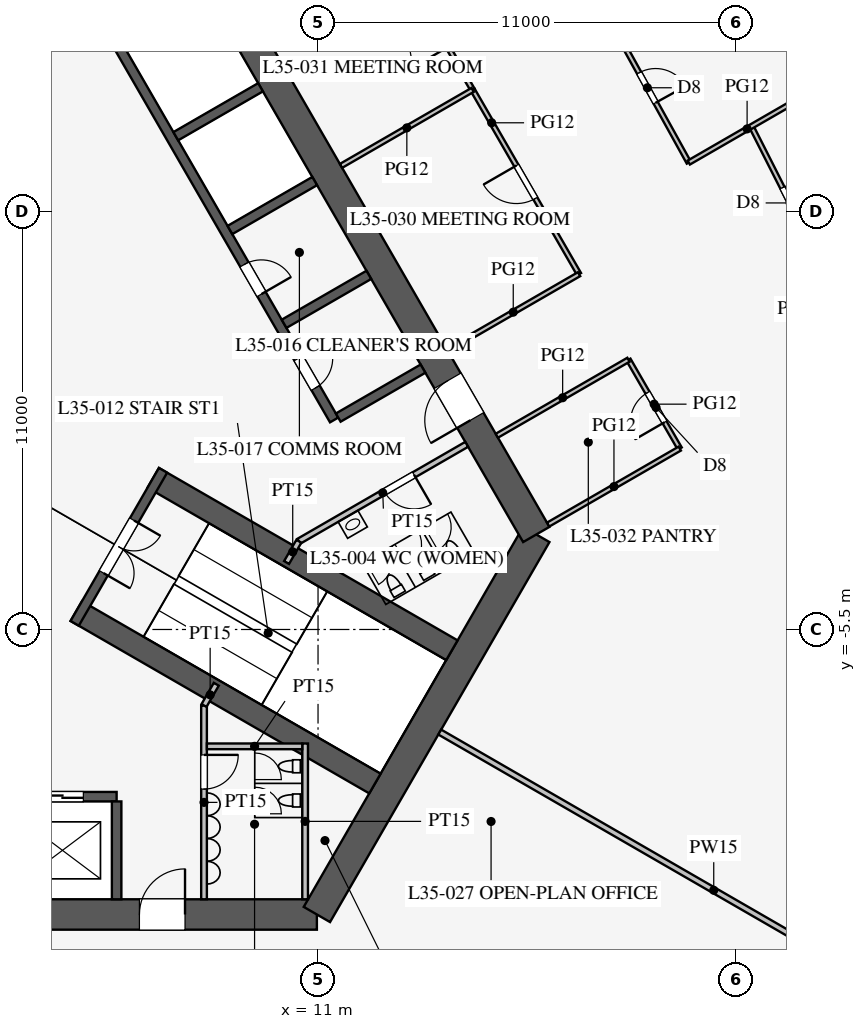
"""IFC4 building model, lengths in metres.
Left out: names, types, materials, properties, quantities, classifications, styles, units other than length and angle.
Written with IfcOpenShell. Run it as: python <this file> out.ifc"""

import sys

from ifc_helpers import new_model, si_unit, direction, frame, frame_2d, origin, place, context, subcontext, project, spatial, rectangle, extrude, element, fill, save


model = new_model("IFC4")
c1 = context("Model", 3, precision=1e-05, world=origin(), true_north=direction((0.0, 1.0)))
c2 = subcontext(c1, "Body", "Model", "MODEL_VIEW")
j1 = project(units=[si_unit("LENGTHUNIT", "METRE"), si_unit("PLANEANGLEUNIT", "RADIAN")], contexts=[c1])
p1 = place(None, origin())
s1 = spatial("IfcSite", under=j1, at=p1, CompositionType="ELEMENT")
p2 = place(p1, origin())
s2 = spatial("IfcBuilding", under=s1, at=p2, CompositionType="ELEMENT")
p3 = place(p2, frame((0.0, 0.0, 153.5)))
s3 = spatial("IfcBuildingStorey", under=s2, at=p3, CompositionType="ELEMENT", Elevation=153.5)
p4 = place(p3, frame((-10.97, -13.0, 0.0), z_axis=(0.0, 0.0, 1.0), x_axis=(1.0, 0.0, 0.0)))
e1 = element("IfcWall", 1, at=p4, inside=s3, PredefinedType="SHEAR", context=c2, shape_type="SweptSolid", body=[
    extrude(rectangle(XDim=21.939, YDim=0.8, at=frame_2d((10.97, 0.0))), origin(), (0.0, 0.0, 1.0), 4.2),
])
p5 = place(p4, frame((17.27, 0.0, 0.0)))
e2 = element("IfcOpeningElement", 2, at=p5, cuts=e1, PredefinedType="OPENING", context=c2, shape_type="SweptSolid", body=[
    extrude(rectangle(XDim=1.2, YDim=2.1, at=frame_2d((0.6, 1.05))), frame((0.0, 0.41, 0.0), z_axis=(0.0, -1.0, 0.0), x_axis=(1.0, 0.0, 0.0)), (0.0, 0.0, 1.0), 0.82),
])
p6 = place(p4, frame((3.47, 0.0, 0.0)))
e3 = element("IfcOpeningElement", 3, at=p6, cuts=e1, PredefinedType="OPENING", context=c2, shape_type="SweptSolid", body=[
    extrude(rectangle(XDim=1.2, YDim=2.1, at=frame_2d((0.6, 1.05))), frame((0.0, 0.41, 0.0), z_axis=(0.0, -1.0, 0.0), x_axis=(1.0, 0.0, 0.0)), (0.0, 0.0, 1.0), 0.82),
])
p7 = place(p3, frame((10.97, -13.0, 0.0), z_axis=(0.0, 0.0, 1.0), x_axis=(0.499995765644, 0.866027848477, 0.0)))
e4 = element("IfcWall", 4, at=p7, inside=s3, PredefinedType="SHEAR", context=c2, shape_type="SweptSolid", body=[
    extrude(rectangle(XDim=11.547, YDim=0.8, at=frame_2d((5.773, 0.0))), origin(), (0.0, 0.0, 1.0), 4.2),
])
p8 = place(p3, frame((16.743, -3.0, 0.0), z_axis=(0.0, 0.0, 1.0), x_axis=(-0.500002442456, 0.866023993627, 0.0)))
e5 = element("IfcWall", 5, at=p8, inside=s3, PredefinedType="SHEAR", context=c2, shape_type="SweptSolid", body=[
    extrude(rectangle(XDim=21.939, YDim=0.8, at=frame_2d((10.97, 0.0))), origin(), (0.0, 0.0, 1.0), 4.2),
])
p9 = place(p8, frame((17.27, 0.0, 0.0)))
e6 = element("IfcOpeningElement", 6, at=p9, cuts=e5, PredefinedType="OPENING", context=c2, shape_type="SweptSolid", body=[
    extrude(rectangle(XDim=1.2, YDim=2.1, at=frame_2d((0.6, 1.05))), frame((0.0, 0.41, 0.0), z_axis=(0.0, -1.0, 0.0), x_axis=(1.0, 0.0, 0.0)), (0.0, 0.0, 1.0), 0.82),
])
p10 = place(p8, frame((3.47, 0.0, 0.0)))
e7 = element("IfcOpeningElement", 7, at=p10, cuts=e5, PredefinedType="OPENING", context=c2, shape_type="SweptSolid", body=[
    extrude(rectangle(XDim=1.2, YDim=2.1, at=frame_2d((0.6, 1.05))), frame((0.0, 0.41, 0.0), z_axis=(0.0, -1.0, 0.0), x_axis=(1.0, 0.0, 0.0)), (0.0, 0.0, 1.0), 0.82),
])
p11 = place(p3, frame((-5.7, -9.9, 0.0), z_axis=(0.0, 0.0, 1.0), x_axis=(1.0, 0.0, 0.0)))
e8 = element("IfcWall", 8, at=p11, inside=s3, PredefinedType="SHEAR", context=c2, shape_type="SweptSolid", body=[
    extrude(rectangle(XDim=11.4, YDim=0.25, at=frame_2d((5.7, 0.0))), origin(), (0.0, 0.0, 1.0), 4.2),
])
p12 = place(p11, frame((0.875, 0.0, 0.0)))
e9 = element("IfcOpeningElement", 9, at=p12, cuts=e8, PredefinedType="OPENING", context=c2, shape_type="SweptSolid", body=[
    extrude(rectangle(XDim=1.1, YDim=2.2, at=frame_2d((0.55, 1.1))), frame((0.0, 0.135, 0.0), z_axis=(0.0, -1.0, 0.0), x_axis=(1.0, 0.0, 0.0)), (0.0, 0.0, 1.0), 0.27),
])
p13 = place(p11, frame((3.725, 0.0, 0.0)))
e10 = element("IfcOpeningElement", 10, at=p13, cuts=e8, PredefinedType="OPENING", context=c2, shape_type="SweptSolid", body=[
    extrude(rectangle(XDim=1.1, YDim=2.2, at=frame_2d((0.55, 1.1))), frame((0.0, 0.135, 0.0), z_axis=(0.0, -1.0, 0.0), x_axis=(1.0, 0.0, 0.0)), (0.0, 0.0, 1.0), 0.27),
])
p14 = place(p11, frame((6.575, 0.0, 0.0)))
e11 = element("IfcOpeningElement", 11, at=p14, cuts=e8, PredefinedType="OPENING", context=c2, shape_type="SweptSolid", body=[
    extrude(rectangle(XDim=1.1, YDim=2.2, at=frame_2d((0.55, 1.1))), frame((0.0, 0.135, 0.0), z_axis=(0.0, -1.0, 0.0), x_axis=(1.0, 0.0, 0.0)), (0.0, 0.0, 1.0), 0.27),
])
p15 = place(p11, frame((9.425, 0.0, 0.0)))
e12 = element("IfcOpeningElement", 12, at=p15, cuts=e8, PredefinedType="OPENING", context=c2, shape_type="SweptSolid", body=[
    extrude(rectangle(XDim=1.1, YDim=2.2, at=frame_2d((0.55, 1.1))), frame((0.0, 0.135, 0.0), z_axis=(0.0, -1.0, 0.0), x_axis=(1.0, 0.0, 0.0)), (0.0, 0.0, 1.0), 0.27),
])
p16 = place(p3, frame((5.7, -10.025, 0.0), z_axis=(0.0, 0.0, 1.0), x_axis=(0.0, -1.0, 0.0)))
e13 = element("IfcWall", 13, at=p16, inside=s3, PredefinedType="SHEAR", context=c2, shape_type="SweptSolid", body=[
    extrude(rectangle(XDim=2.575, YDim=0.25, at=frame_2d((1.288, 0.0))), origin(), (0.0, 0.0, 1.0), 4.2),
])
p17 = place(p3, frame((11.424, 0.014, 0.0), z_axis=(0.0, 0.0, 1.0), x_axis=(-0.500001763848, 0.866024385424, 0.0)))
e14 = element("IfcWall", 14, at=p17, inside=s3, PredefinedType="SHEAR", context=c2, shape_type="SweptSolid", body=[
    extrude(rectangle(XDim=11.4, YDim=0.25, at=frame_2d((5.7, 0.0))), origin(), (0.0, 0.0, 1.0), 4.2),
])
p18 = place(p17, frame((0.975, 0.0, 0.0)))
e15 = element("IfcOpeningElement", 15, at=p18, cuts=e14, PredefinedType="OPENING", context=c2, shape_type="SweptSolid", body=[
    extrude(rectangle(XDim=0.9, YDim=2.1, at=frame_2d((0.45, 1.05))), frame((0.0, 0.135, 0.0), z_axis=(0.0, -1.0, 0.0), x_axis=(1.0, 0.0, 0.0)), (0.0, 0.0, 1.0), 0.27),
])
p19 = place(p17, frame((3.825, 0.0, 0.0)))
e16 = element("IfcOpeningElement", 16, at=p19, cuts=e14, PredefinedType="OPENING", context=c2, shape_type="SweptSolid", body=[
    extrude(rectangle(XDim=0.9, YDim=2.1, at=frame_2d((0.45, 1.05))), frame((0.0, 0.135, 0.0), z_axis=(0.0, -1.0, 0.0), x_axis=(1.0, 0.0, 0.0)), (0.0, 0.0, 1.0), 0.27),
])
for number, where, z_axis, x_axis in (
    (17, (11.532, 0.076, 0.0), (0.0, 0.0, 1.0), (0.866, 0.5, 0.0)),
    (18, (10.107, 2.544, 0.0), (0.0, 0.0, 1.0), (0.866, 0.5, 0.0)),
    (19, (8.682, 5.012, 0.0), (0.0, 0.0, 1.0), (0.866, 0.5, 0.0)),
    (20, (7.257, 7.481, 0.0), (0.0, 0.0, 1.0), (0.866, 0.5, 0.0)),
):
    element("IfcWall", number, at=place(p3, frame(where, z_axis=z_axis, x_axis=x_axis)), inside=s3, PredefinedType="SHEAR", context=c2, shape_type="SweptSolid", body=[
        extrude(rectangle(XDim=2.575, YDim=0.25, at=frame_2d((1.288, 0.0))), origin(), (0.0, 0.0, 1.0), 4.2),
    ])
for number, where, z_axis, x_axis in (
    (21, (4.638, -5.016, 0.0), (0.0, 0.0, 1.0), (0.866, -0.5, 0.0)),
    (22, (6.663, -1.509, 0.0), (0.0, 0.0, 1.0), (0.866, -0.5, 0.0)),
):
    element("IfcWall", number, at=place(p3, frame(where, z_axis=z_axis, x_axis=x_axis)), inside=s3, PredefinedType="SHEAR", context=c2, shape_type="SweptSolid", body=[
        extrude(rectangle(XDim=9.075, YDim=0.6, at=frame_2d((4.538, 0.0))), origin(), (0.0, 0.0, 1.0), 4.2),
    ])
p20 = place(p3, frame((4.597, -5.339, 0.0), z_axis=(0.0, 0.0, 1.0), x_axis=(0.499984536904, 0.866034331223, 0.0)))
e23 = element("IfcWall", 23, at=p20, inside=s3, PredefinedType="SHEAR", context=c2, shape_type="SweptSolid", body=[
    extrude(rectangle(XDim=4.65, YDim=0.25, at=frame_2d((2.325, 0.0))), origin(), (0.0, 0.0, 1.0), 4.2),
])
p21 = place(p20, frame((1.525, 0.0, 0.0)))
e24 = element("IfcOpeningElement", 24, at=p21, cuts=e23, PredefinedType="OPENING", context=c2, shape_type="SweptSolid", body=[
    extrude(rectangle(XDim=1.6, YDim=2.1, at=frame_2d((0.8, 1.05))), frame((0.0, 0.135, 0.0), z_axis=(0.0, -1.0, 0.0), x_axis=(1.0, 0.0, 0.0)), (0.0, 0.0, 1.0), 0.27),
])
p22 = place(p3, frame((8.0, -7.5, 0.0), z_axis=(0.0, 0.0, 1.0), x_axis=(0.0, -1.0, 0.0)))
e25 = element("IfcWall", 25, at=p22, inside=s3, PredefinedType="PARTITIONING", context=c2, shape_type="SweptSolid", body=[
    extrude(rectangle(XDim=5.1, YDim=0.15, at=frame_2d((2.55, 0.0))), origin(), (0.0, 0.0, 1.0), 4.0),
])
p23 = place(p22, frame((1.3, 0.0, 0.0)))
e26 = element("IfcOpeningElement", 26, at=p23, cuts=e25, PredefinedType="OPENING", context=c2, shape_type="SweptSolid", body=[
    extrude(rectangle(XDim=0.9, YDim=2.1, at=frame_2d((0.45, 1.05))), frame((0.0, 0.085, 0.0), z_axis=(0.0, -1.0, 0.0), x_axis=(1.0, 0.0, 0.0)), (0.0, 0.0, 1.0), 0.17),
])
p24 = place(p3, frame((10.495, -3.178, 0.0), z_axis=(0.0, 0.0, 1.0), x_axis=(0.86602216432, 0.500005610874, 0.0)))
e27 = element("IfcWall", 27, at=p24, inside=s3, PredefinedType="PARTITIONING", context=c2, shape_type="SweptSolid", body=[
    extrude(rectangle(XDim=5.1, YDim=0.15, at=frame_2d((2.55, 0.0))), origin(), (0.0, 0.0, 1.0), 4.0),
])
p25 = place(p24, frame((2.6, 0.0, 0.0)))
e28 = element("IfcOpeningElement", 28, at=p25, cuts=e27, PredefinedType="OPENING", context=c2, shape_type="SweptSolid", body=[
    extrude(rectangle(XDim=0.9, YDim=2.1, at=frame_2d((0.45, 1.05))), frame((0.0, 0.085, 0.0), z_axis=(0.0, -1.0, 0.0), x_axis=(1.0, 0.0, 0.0)), (0.0, 0.0, 1.0), 0.17),
])
for number, where, z_axis, x_axis in (
    (29, (8.0, -7.5, 0.0), (0.0, 0.0, 1.0), (0.5, 0.866, 0.0)),
    (30, (10.495, -3.178, 0.0), (0.0, 0.0, 1.0), (-0.5, -0.866, 0.0)),
):
    element("IfcWall", number, at=place(p3, frame(where, z_axis=z_axis, x_axis=x_axis)), inside=s3, PredefinedType="PARTITIONING", context=c2, shape_type="SweptSolid", body=[
        extrude(rectangle(XDim=0.645, YDim=0.15, at=frame_2d((0.323, 0.0))), origin(), (0.0, 0.0, 1.0), 4.0),
    ])
p26 = place(p3, frame((10.66, -8.5, 0.0), z_axis=(0.0, 0.0, 1.0), x_axis=(0.0, -1.0, 0.0)))
e31 = element("IfcWall", 31, at=p26, inside=s3, PredefinedType="PARTITIONING", context=c2, shape_type="SweptSolid", body=[
    extrude(rectangle(XDim=4.1, YDim=0.15, at=frame_2d((2.05, 0.0))), origin(), (0.0, 0.0, 1.0), 4.0),
])
p27 = place(p3, frame((8.075, -8.575, 0.0), z_axis=(0.0, 0.0, 1.0), x_axis=(1.0, 0.0, 0.0)))
e32 = element("IfcWall", 32, at=p27, inside=s3, PredefinedType="PARTITIONING", context=c2, shape_type="SweptSolid", body=[
    extrude(rectangle(XDim=2.51, YDim=0.15, at=frame_2d((1.255, 0.0))), origin(), (0.0, 0.0, 1.0), 4.0),
])
p28 = place(p3, frame((14.203, -8.2, 0.0), z_axis=(0.0, 0.0, 1.0), x_axis=(0.866024668836, -0.500001272966, 0.0)))
e33 = element("IfcWall", 33, at=p28, inside=s3, PredefinedType="PARTITIONING", context=c2, shape_type="SweptSolid", body=[
    extrude(rectangle(XDim=16.65, YDim=0.15, at=frame_2d((8.325, 0.0))), origin(), (0.0, 0.0, 1.0), 2.3),
])
p29 = place(p3, frame((15.069, 8.7, 0.0), z_axis=(0.0, 0.0, 1.0), x_axis=(-0.500012057535, 0.866018442252, 0.0)))
e34 = element("IfcWall", 34, at=p29, inside=s3, PredefinedType="PARTITIONING", context=c2, shape_type="SweptSolid", body=[
    extrude(rectangle(XDim=3.6, YDim=0.12, at=frame_2d((1.8, 0.0))), origin(), (0.0, 0.0, 1.0), 2.9),
])
p30 = place(p29, frame((1.3, 0.0, 0.15)))
e35 = element("IfcOpeningElement", 35, at=p30, cuts=e34, PredefinedType="OPENING", context=c2, shape_type="SweptSolid", body=[
    extrude(rectangle(XDim=1.0, YDim=2.1, at=frame_2d((0.5, 1.05))), frame((0.0, 0.07, 0.0), z_axis=(0.0, -1.0, 0.0), x_axis=(1.0, 0.0, 0.0)), (0.0, 0.0, 1.0), 0.14),
])
p31 = place(p3, frame((20.519, -0.74, 0.0), z_axis=(0.0, 0.0, 1.0), x_axis=(-0.4999416173, 0.866059108428, 0.0)))
e36 = element("IfcWall", 36, at=p31, inside=s3, PredefinedType="PARTITIONING", context=c2, shape_type="SweptSolid", body=[
    extrude(rectangle(XDim=2.7, YDim=0.12, at=frame_2d((1.35, 0.0))), origin(), (0.0, 0.0, 1.0), 2.9),
])
p32 = place(p31, frame((0.8, 0.0, 0.15)))
e37 = element("IfcOpeningElement", 37, at=p32, cuts=e36, PredefinedType="OPENING", context=c2, shape_type="SweptSolid", body=[
    extrude(rectangle(XDim=0.9, YDim=2.1, at=frame_2d((0.45, 1.05))), frame((0.0, 0.07, 0.0), z_axis=(0.0, -1.0, 0.0), x_axis=(1.0, 0.0, 0.0)), (0.0, 0.0, 1.0), 0.14),
])
p33 = place(p3, frame((17.869, 3.85, 0.0), z_axis=(0.0, 0.0, 1.0), x_axis=(-0.500016814911, 0.866015695474, 0.0)))
e38 = element("IfcWall", 38, at=p33, inside=s3, PredefinedType="PARTITIONING", context=c2, shape_type="SweptSolid", body=[
    extrude(rectangle(XDim=5.6, YDim=0.12, at=frame_2d((2.8, 0.0))), origin(), (0.0, 0.0, 1.0), 2.9),
])
p34 = place(p33, frame((2.3, 0.0, 0.15)))
e39 = element("IfcOpeningElement", 39, at=p34, cuts=e38, PredefinedType="OPENING", context=c2, shape_type="SweptSolid", body=[
    extrude(rectangle(XDim=1.0, YDim=2.1, at=frame_2d((0.5, 1.05))), frame((0.0, 0.07, 0.0), z_axis=(0.0, -1.0, 0.0), x_axis=(1.0, 0.0, 0.0)), (0.0, 0.0, 1.0), 0.14),
])
p35 = place(p3, frame((11.605, 6.7, 0.0), z_axis=(0.0, 0.0, 1.0), x_axis=(0.866026010844, 0.49999894854, 0.0)))
e40 = element("IfcWall", 40, at=p35, inside=s3, PredefinedType="PARTITIONING", context=c2, shape_type="SweptSolid", body=[
    extrude(rectangle(XDim=4.0, YDim=0.12, at=frame_2d((2.0, 0.0))), origin(), (0.0, 0.0, 1.0), 2.8),
])
for number, where, z_axis, x_axis in (
    (41, (17.055, -2.74, 0.0), (0.0, 0.0, 1.0), (0.866, 0.5, 0.0)),
    (42, (14.405, 1.85, 0.0), (0.0, 0.0, 1.0), (0.866, 0.5, 0.0)),
    (43, (15.705, -0.401, 0.0), (0.0, 0.0, 1.0), (0.866, 0.5, 0.0)),
):
    element("IfcWall", number, at=place(p3, frame(where, z_axis=z_axis, x_axis=x_axis)), inside=s3, PredefinedType="PARTITIONING", context=c2, shape_type="SweptSolid", body=[
        extrude(rectangle(XDim=4.0, YDim=0.12, at=frame_2d((2.0, 0.0))), origin(), (0.0, 0.0, 1.0), 2.9),
    ])
p36 = place(p3, frame((20.756, 6.787, 0.0), z_axis=(0.0, 0.0, 1.0), x_axis=(-0.484292898211, 0.874905931368, 0.0)))
e44 = element("IfcWall", 44, at=p36, inside=s3, PredefinedType="PARTITIONING", context=c2, shape_type="SweptSolid", body=[
    extrude(rectangle(XDim=4.501, YDim=0.12, at=frame_2d((2.25, 0.0))), origin(), (0.0, 0.0, 1.0), 2.9),
])
p37 = place(p36, frame((1.8, 0.0, 0.15)))
e45 = element("IfcOpeningElement", 45, at=p37, cuts=e44, PredefinedType="OPENING", context=c2, shape_type="SweptSolid", body=[
    extrude(rectangle(XDim=0.9, YDim=2.1, at=frame_2d((0.45, 1.05))), frame((0.0, 0.07, 0.0), z_axis=(0.0, -1.0, 0.0), x_axis=(1.0, 0.0, 0.0)), (0.0, 0.0, 1.0), 0.14),
])
p38 = place(p3, frame((24.44, 3.718, 0.0), z_axis=(0.0, 0.0, 1.0), x_axis=(-0.452471679136, 0.891778772779, 0.0)))
e46 = element("IfcWall", 46, at=p38, inside=s3, PredefinedType="PARTITIONING", context=c2, shape_type="SweptSolid", body=[
    extrude(rectangle(XDim=4.507, YDim=0.12, at=frame_2d((2.253, 0.0))), origin(), (0.0, 0.0, 1.0), 2.9),
])
p39 = place(p38, frame((1.8, 0.0, 0.15)))
e47 = element("IfcOpeningElement", 47, at=p39, cuts=e46, PredefinedType="OPENING", context=c2, shape_type="SweptSolid", body=[
    extrude(rectangle(XDim=0.9, YDim=2.1, at=frame_2d((0.45, 1.05))), frame((0.0, 0.07, 0.0), z_axis=(0.0, -1.0, 0.0), x_axis=(1.0, 0.0, 0.0)), (0.0, 0.0, 1.0), 0.14),
])
p40 = place(p3, frame((20.756, 6.787, 0.0), z_axis=(0.0, 0.0, 1.0), x_axis=(0.866038754309, 0.499976875499, 0.0)))
e48 = element("IfcWall", 48, at=p40, inside=s3, PredefinedType="PARTITIONING", context=c2, shape_type="SweptSolid", body=[
    extrude(rectangle(XDim=3.544, YDim=0.12, at=frame_2d((1.772, 0.0))), origin(), (0.0, 0.0, 1.0), 2.8),
])
p41 = place(p23, origin())
e49 = element("IfcDoor", 49, at=p41, inside=s3, OperationType="SINGLE_SWING_LEFT", PredefinedType="DOOR", context=c2, shape_type="SweptSolid", body=[
    extrude(rectangle(XDim=0.9, YDim=2.1, at=frame_2d((0.45, 1.05))), frame((0.0, 0.025, 0.0), z_axis=(0.0, -1.0, 0.0), x_axis=(1.0, 0.0, 0.0)), (0.0, 0.0, 1.0), 0.05),
])
fill(e26, e49)
p42 = place(p25, frame((0.9, 0.0, 0.0), z_axis=(0.0, 0.0, 1.0), x_axis=(-1.0, 0.0, 0.0)))
e50 = element("IfcDoor", 50, at=p42, inside=s3, OperationType="SINGLE_SWING_LEFT", PredefinedType="DOOR", context=c2, shape_type="SweptSolid", body=[
    extrude(rectangle(XDim=0.9, YDim=2.1, at=frame_2d((0.45, 1.05))), frame((0.0, 0.025, 0.0), z_axis=(0.0, -1.0, 0.0), x_axis=(1.0, 0.0, 0.0)), (0.0, 0.0, 1.0), 0.05),
])
fill(e28, e50)
p43 = place(p21, frame((1.6, 0.0, 0.0), z_axis=(0.0, 0.0, 1.0), x_axis=(-1.0, 0.0, 0.0)))
e51 = element("IfcDoor", 51, at=p43, inside=s3, OperationType="DOUBLE_DOOR_SINGLE_SWING", PredefinedType="DOOR", context=c2, shape_type="SweptSolid", body=[
    extrude(rectangle(XDim=1.6, YDim=2.1, at=frame_2d((0.8, 1.05))), frame((0.0, 0.025, 0.0), z_axis=(0.0, -1.0, 0.0), x_axis=(1.0, 0.0, 0.0)), (0.0, 0.0, 1.0), 0.05),
])
fill(e24, e51)
p44 = place(p5, origin())
e52 = element("IfcDoor", 52, at=p44, inside=s3, OperationType="SINGLE_SWING_RIGHT", PredefinedType="DOOR", context=c2, shape_type="SweptSolid", body=[
    extrude(rectangle(XDim=1.2, YDim=2.1, at=frame_2d((0.6, 1.05))), frame((0.0, 0.025, 0.0), z_axis=(0.0, -1.0, 0.0), x_axis=(1.0, 0.0, 0.0)), (0.0, 0.0, 1.0), 0.05),
])
fill(e2, e52)
p45 = place(p10, origin())
e53 = element("IfcDoor", 53, at=p45, inside=s3, OperationType="SINGLE_SWING_LEFT", PredefinedType="DOOR", context=c2, shape_type="SweptSolid", body=[
    extrude(rectangle(XDim=1.2, YDim=2.1, at=frame_2d((0.6, 1.05))), frame((0.0, 0.025, 0.0), z_axis=(0.0, -1.0, 0.0), x_axis=(1.0, 0.0, 0.0)), (0.0, 0.0, 1.0), 0.05),
])
fill(e7, e53)
p46 = place(p18, frame((0.9, 0.0, 0.0), z_axis=(0.0, 0.0, 1.0), x_axis=(-1.0, 0.0, 0.0)))
e54 = element("IfcDoor", 54, at=p46, inside=s3, OperationType="SINGLE_SWING_LEFT", PredefinedType="DOOR", context=c2, shape_type="SweptSolid", body=[
    extrude(rectangle(XDim=0.9, YDim=2.1, at=frame_2d((0.45, 1.05))), frame((0.0, 0.025, 0.0), z_axis=(0.0, -1.0, 0.0), x_axis=(1.0, 0.0, 0.0)), (0.0, 0.0, 1.0), 0.05),
])
fill(e15, e54)
p47 = place(p19, frame((0.9, 0.0, 0.0), z_axis=(0.0, 0.0, 1.0), x_axis=(-1.0, 0.0, 0.0)))
e55 = element("IfcDoor", 55, at=p47, inside=s3, OperationType="SINGLE_SWING_RIGHT", PredefinedType="DOOR", context=c2, shape_type="SweptSolid", body=[
    extrude(rectangle(XDim=0.9, YDim=2.1, at=frame_2d((0.45, 1.05))), frame((0.0, 0.025, 0.0), z_axis=(0.0, -1.0, 0.0), x_axis=(1.0, 0.0, 0.0)), (0.0, 0.0, 1.0), 0.05),
])
fill(e16, e55)
p48 = place(p34, origin())
e56 = element("IfcDoor", 56, at=p48, inside=s3, OperationType="SINGLE_SWING_RIGHT", PredefinedType="DOOR", context=c2, shape_type="SweptSolid", body=[
    extrude(rectangle(XDim=1.0, YDim=2.1, at=frame_2d((0.5, 1.05))), frame((0.0, 0.025, 0.0), z_axis=(0.0, -1.0, 0.0), x_axis=(1.0, 0.0, 0.0)), (0.0, 0.0, 1.0), 0.05),
])
fill(e39, e56)
p49 = place(p32, origin())
e57 = element("IfcDoor", 57, at=p49, inside=s3, OperationType="SINGLE_SWING_LEFT", PredefinedType="DOOR", context=c2, shape_type="SweptSolid", body=[
    extrude(rectangle(XDim=0.9, YDim=2.1, at=frame_2d((0.45, 1.05))), frame((0.0, 0.025, 0.0), z_axis=(0.0, -1.0, 0.0), x_axis=(1.0, 0.0, 0.0)), (0.0, 0.0, 1.0), 0.05),
])
fill(e37, e57)
p50 = place(p37, frame((0.9, 0.0, 0.0), z_axis=(0.0, 0.0, 1.0), x_axis=(-1.0, 0.0, 0.0)))
e58 = element("IfcDoor", 58, at=p50, inside=s3, OperationType="SINGLE_SWING_RIGHT", PredefinedType="DOOR", context=c2, shape_type="SweptSolid", body=[
    extrude(rectangle(XDim=0.9, YDim=2.1, at=frame_2d((0.45, 1.05))), frame((0.0, 0.025, 0.0), z_axis=(0.0, -1.0, 0.0), x_axis=(1.0, 0.0, 0.0)), (0.0, 0.0, 1.0), 0.05),
])
fill(e45, e58)
p51 = place(p39, frame((0.9, 0.0, 0.0), z_axis=(0.0, 0.0, 1.0), x_axis=(-1.0, 0.0, 0.0)))
e59 = element("IfcDoor", 59, at=p51, inside=s3, OperationType="SINGLE_SWING_RIGHT", PredefinedType="DOOR", context=c2, shape_type="SweptSolid", body=[
    extrude(rectangle(XDim=0.9, YDim=2.1, at=frame_2d((0.45, 1.05))), frame((0.0, 0.025, 0.0), z_axis=(0.0, -1.0, 0.0), x_axis=(1.0, 0.0, 0.0)), (0.0, 0.0, 1.0), 0.05),
])
fill(e47, e59)
p52 = place(p15, origin())
e60 = element("IfcDoor", 60, at=p52, inside=s3, OperationType="DOUBLE_DOOR_SLIDING", PredefinedType="DOOR", context=c2, shape_type="SweptSolid", body=[
    extrude(rectangle(XDim=1.1, YDim=2.2, at=frame_2d((0.55, 1.1))), frame((0.0, 0.025, 0.0), z_axis=(0.0, -1.0, 0.0), x_axis=(1.0, 0.0, 0.0)), (0.0, 0.0, 1.0), 0.05),
])
fill(e12, e60)
save(model, sys.argv[1])
